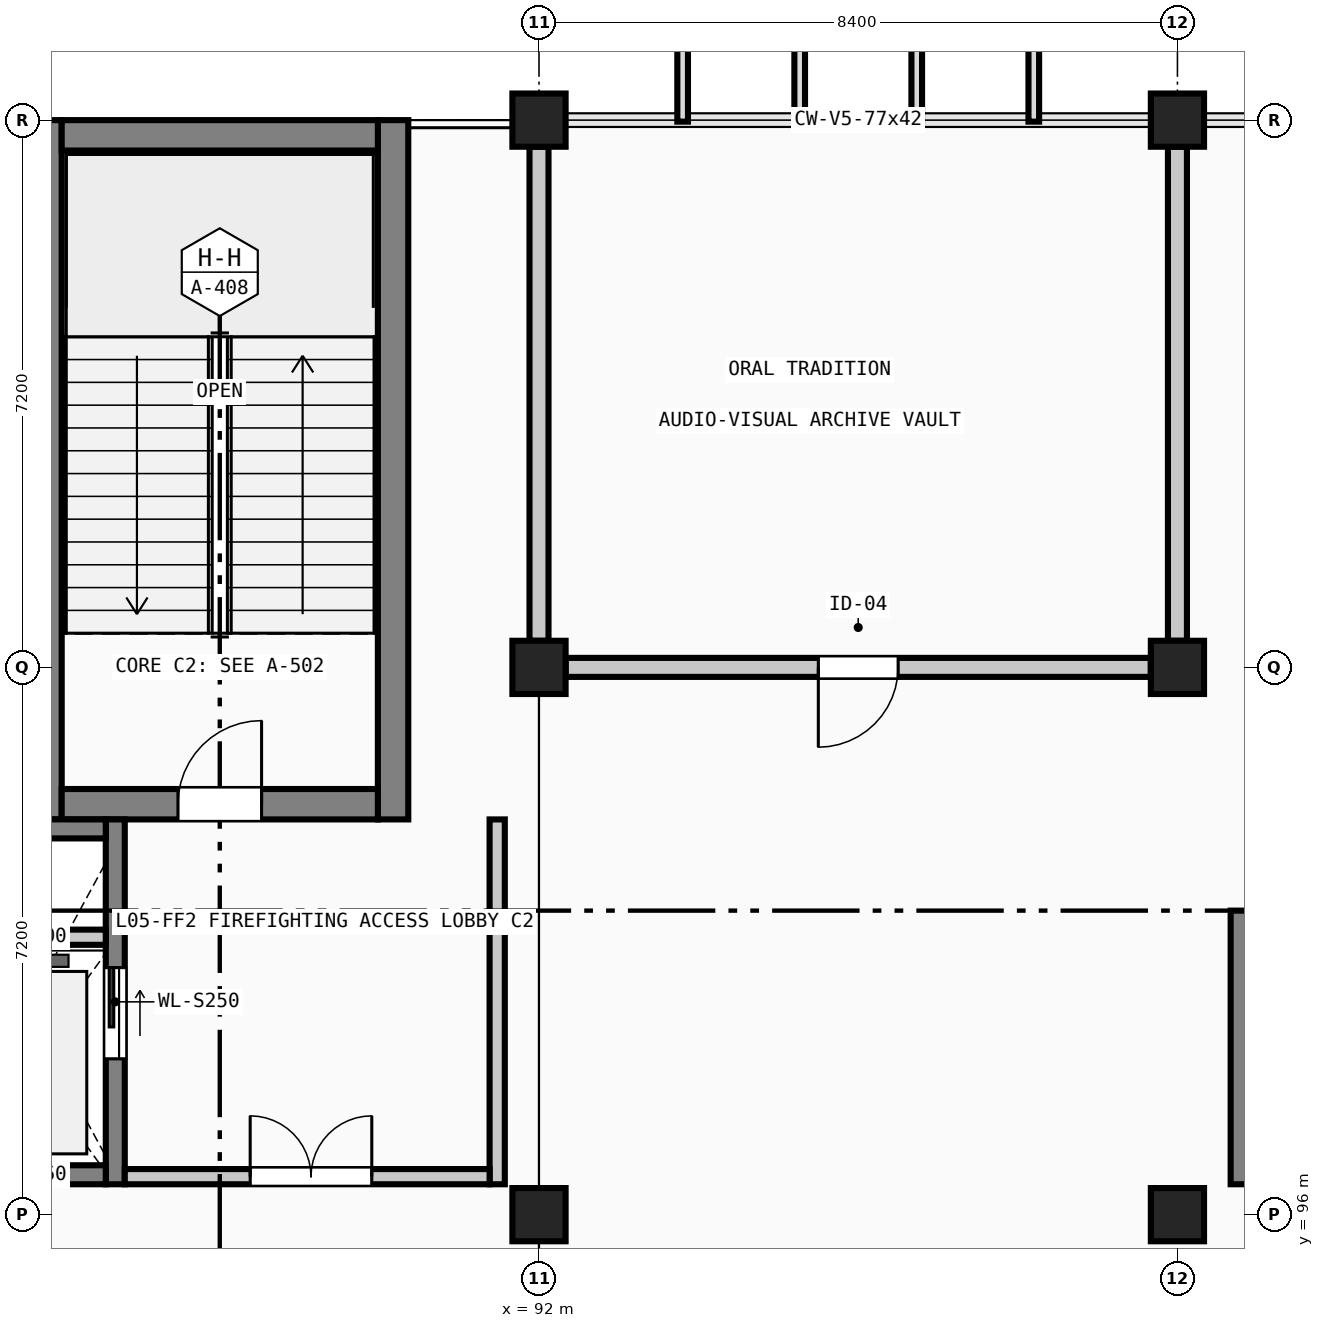
"""IFC4 building model, lengths in metres.
Left out: names, types, materials, properties, quantities, classifications, styles, units other than length and angle.
Written with IfcOpenShell. Run it as: python <this file> out.ifc"""

import sys

from ifc_helpers import new_model, si_unit, direction, frame, frame_2d, origin, origin_2d, place, context, subcontext, project, spatial, rectangle, extrude, element, fill, save


model = new_model("IFC4")
c1 = context("Model", 3, precision=1e-05, world=origin(), true_north=direction((0.0, 1.0)))
c2 = subcontext(c1, "Body", "Model", "MODEL_VIEW")
j1 = project(units=[si_unit("LENGTHUNIT", "METRE"), si_unit("PLANEANGLEUNIT", "RADIAN")], contexts=[c1])
p1 = place(None, origin())
s1 = spatial("IfcSite", under=j1, at=p1, CompositionType="ELEMENT")
p2 = place(p1, origin())
s2 = spatial("IfcBuilding", under=s1, at=p2, CompositionType="ELEMENT")
p3 = place(p2, frame((0.0, 0.0, 23.36)))
s3 = spatial("IfcBuildingStorey", under=s2, at=p3, CompositionType="ELEMENT", Elevation=23.36)
for number, where, z_axis, x_axis in (
    (1, (92.0, 96.0, 0.0), (0.0, 0.0, 1.0), (1.0, 0.0, 0.0)),
    (2, (92.0, 103.2, 0.0), (0.0, 0.0, 1.0), (1.0, 0.0, 0.0)),
    (3, (92.0, 110.4, 0.0), (0.0, 0.0, 1.0), (1.0, 0.0, 0.0)),
    (4, (100.4, 96.0, 0.0), (0.0, 0.0, 1.0), (1.0, 0.0, 0.0)),
    (5, (100.4, 103.2, 0.0), (0.0, 0.0, 1.0), (1.0, 0.0, 0.0)),
    (6, (100.4, 110.4, 0.0), (0.0, 0.0, 1.0), (1.0, 0.0, 0.0)),
):
    element("IfcColumn", number, at=place(p3, frame(where, z_axis=z_axis, x_axis=x_axis)), inside=s3, PredefinedType="COLUMN", context=c2, shape_type="SweptSolid", body=[
        extrude(rectangle(XDim=0.7, YDim=0.7, at=origin_2d()), origin(), (0.0, 0.0, 1.0), 4.48),
    ])
for number, where, z_axis, x_axis in (
    (7, (85.52, 101.2, 0.0), (0.0, 0.0, 1.0), (0.0, 1.0, 0.0)),
    (8, (90.08, 110.4, 0.0), (0.0, 0.0, 1.0), (0.0, -1.0, 0.0)),
):
    element("IfcWall", number, at=place(p3, frame(where, z_axis=z_axis, x_axis=x_axis)), inside=s3, PredefinedType="SHEAR", context=c2, shape_type="SweptSolid", body=[
        extrude(rectangle(XDim=9.2, YDim=0.4, at=frame_2d((4.6, 0.0))), origin(), (0.0, 0.0, 1.0), 4.205),
    ])
p4 = place(p3, frame((89.88, 101.4, 0.0), z_axis=(0.0, 0.0, 1.0), x_axis=(-1.0, 0.0, 0.0)))
e9 = element("IfcWall", 9, at=p4, inside=s3, PredefinedType="SHEAR", context=c2, shape_type="SweptSolid", body=[
    extrude(rectangle(XDim=4.16, YDim=0.4, at=frame_2d((2.08, 0.0))), origin(), (0.0, 0.0, 1.0), 4.205),
])
p5 = place(p4, frame((1.53, 0.0, 0.0)))
e10 = element("IfcOpeningElement", 10, at=p5, cuts=e9, PredefinedType="OPENING", context=c2, shape_type="SweptSolid", body=[
    extrude(rectangle(XDim=1.1, YDim=2.2, at=frame_2d((0.55, 1.1))), frame((0.0, 0.21, 0.0), z_axis=(0.0, -1.0, 0.0), x_axis=(1.0, 0.0, 0.0)), (0.0, 0.0, 1.0), 0.42),
])
p6 = place(p3, frame((85.72, 110.2, 0.0), z_axis=(0.0, 0.0, 1.0), x_axis=(1.0, 0.0, 0.0)))
e11 = element("IfcWall", 11, at=p6, inside=s3, PredefinedType="SHEAR", context=c2, shape_type="SweptSolid", body=[
    extrude(rectangle(XDim=4.16, YDim=0.4, at=frame_2d((2.08, 0.0))), origin(), (0.0, 0.0, 1.0), 4.205),
])
p7 = place(p3, frame((86.425, 101.2, 0.0), z_axis=(0.0, 0.0, 1.0), x_axis=(0.0, -1.0, 0.0)))
e12 = element("IfcWall", 12, at=p7, inside=s3, PredefinedType="SOLIDWALL", context=c2, shape_type="SweptSolid", body=[
    extrude(rectangle(XDim=4.8, YDim=0.25, at=frame_2d((2.4, 0.0))), origin(), (0.0, 0.0, 1.0), 4.205),
])
p8 = place(p7, frame((1.95, 0.0, 0.0)))
e13 = element("IfcOpeningElement", 13, at=p8, cuts=e12, PredefinedType="OPENING", context=c2, shape_type="SweptSolid", body=[
    extrude(rectangle(XDim=1.2, YDim=2.2, at=frame_2d((0.6, 1.1))), frame((0.0, 0.135, 0.0), z_axis=(0.0, -1.0, 0.0), x_axis=(1.0, 0.0, 0.0)), (0.0, 0.0, 1.0), 0.27),
])
for number, where, z_axis, x_axis in (
    (14, (86.3, 96.525, 0.0), (0.0, 0.0, 1.0), (-1.0, 0.0, 0.0)),
    (15, (84.2, 101.075, 0.0), (0.0, 0.0, 1.0), (1.0, 0.0, 0.0)),
):
    element("IfcWall", number, at=place(p3, frame(where, z_axis=z_axis, x_axis=x_axis)), inside=s3, PredefinedType="SOLIDWALL", context=c2, shape_type="SweptSolid", body=[
        extrude(rectangle(XDim=2.1, YDim=0.25, at=frame_2d((1.05, 0.0))), origin(), (0.0, 0.0, 1.0), 4.205),
    ])
p9 = place(p3, frame((84.2, 99.65, 0.0), z_axis=(0.0, 0.0, 1.0), x_axis=(1.0, 0.0, 0.0)))
e16 = element("IfcWall", 16, at=p9, inside=s3, PredefinedType="SOLIDWALL", context=c2, shape_type="SweptSolid", body=[
    extrude(rectangle(XDim=2.1, YDim=0.2, at=frame_2d((1.05, 0.0))), origin(), (0.0, 0.0, 1.0), 4.205),
])
p10 = place(p3, frame((91.45, 101.2, 0.0), z_axis=(0.0, 0.0, 1.0), x_axis=(0.0, -1.0, 0.0)))
e17 = element("IfcWall", 17, at=p10, inside=s3, PredefinedType="SOLIDWALL", context=c2, shape_type="SweptSolid", body=[
    extrude(rectangle(XDim=4.8, YDim=0.2, at=frame_2d((2.4, 0.0))), origin(), (0.0, 0.0, 1.0), 4.205),
])
p11 = place(p3, frame((91.35, 96.5, 0.0), z_axis=(0.0, 0.0, 1.0), x_axis=(-1.0, 0.0, 0.0)))
e18 = element("IfcWall", 18, at=p11, inside=s3, PredefinedType="SOLIDWALL", context=c2, shape_type="SweptSolid", body=[
    extrude(rectangle(XDim=4.8, YDim=0.2, at=frame_2d((2.4, 0.0))), origin(), (0.0, 0.0, 1.0), 4.205),
])
p12 = place(p11, frame((1.55, 0.0, 0.0)))
e19 = element("IfcOpeningElement", 19, at=p12, cuts=e18, PredefinedType="OPENING", context=c2, shape_type="SweptSolid", body=[
    extrude(rectangle(XDim=1.6, YDim=2.2, at=frame_2d((0.8, 1.1))), frame((0.0, 0.11, 0.0), z_axis=(0.0, -1.0, 0.0), x_axis=(1.0, 0.0, 0.0)), (0.0, 0.0, 1.0), 0.22),
])
p13 = place(p3, frame((101.225, 96.4, 0.0), z_axis=(0.0, 0.0, 1.0), x_axis=(0.0, 1.0, 0.0)))
e20 = element("IfcWall", 20, at=p13, inside=s3, PredefinedType="SOLIDWALL", context=c2, shape_type="SweptSolid", body=[
    extrude(rectangle(XDim=3.6, YDim=0.25, at=frame_2d((1.8, 0.0))), origin(), (0.0, 0.0, 1.0), 4.255),
])
p14 = place(p3, frame((100.05, 103.2, 0.0), z_axis=(0.0, 0.0, 1.0), x_axis=(-1.0, 0.0, 0.0)))
e21 = element("IfcWall", 21, at=p14, inside=s3, PredefinedType="SOLIDWALL", context=c2, shape_type="SweptSolid", body=[
    extrude(rectangle(XDim=7.7, YDim=0.25, at=frame_2d((3.85, 0.0))), origin(), (0.0, 0.0, 1.0), 3.53),
])
p15 = place(p14, frame((3.325, 0.0, 0.0)))
e22 = element("IfcOpeningElement", 22, at=p15, cuts=e21, PredefinedType="OPENING", context=c2, shape_type="SweptSolid", body=[
    extrude(rectangle(XDim=1.05, YDim=2.2, at=frame_2d((0.525, 1.1))), frame((0.0, 0.135, 0.0), z_axis=(0.0, -1.0, 0.0), x_axis=(1.0, 0.0, 0.0)), (0.0, 0.0, 1.0), 0.27),
])
for number, where, z_axis, x_axis in (
    (23, (92.0, 103.55, 0.0), (0.0, 0.0, 1.0), (0.0, 1.0, 0.0)),
    (24, (100.4, 110.05, 0.0), (0.0, 0.0, 1.0), (0.0, -1.0, 0.0)),
):
    element("IfcWall", number, at=place(p3, frame(where, z_axis=z_axis, x_axis=x_axis)), inside=s3, PredefinedType="SOLIDWALL", context=c2, shape_type="SweptSolid", body=[
        extrude(rectangle(XDim=6.5, YDim=0.25, at=frame_2d((3.25, 0.0))), origin(), (0.0, 0.0, 1.0), 3.53),
    ])
p16 = place(p5, frame((1.1, 0.0, 0.0), z_axis=(0.0, 0.0, 1.0), x_axis=(-1.0, 0.0, 0.0)))
e25 = element("IfcDoor", 25, at=p16, inside=s3, OperationType="SINGLE_SWING_RIGHT", PredefinedType="DOOR", context=c2, shape_type="SweptSolid", body=[
    extrude(rectangle(XDim=1.1, YDim=2.2, at=frame_2d((0.55, 1.1))), frame((0.0, 0.025, 0.0), z_axis=(0.0, -1.0, 0.0), x_axis=(1.0, 0.0, 0.0)), (0.0, 0.0, 1.0), 0.05),
])
fill(e10, e25)
p17 = place(p8, origin())
e26 = element("IfcDoor", 26, at=p17, inside=s3, OperationType="SLIDING_TO_LEFT", PredefinedType="DOOR", context=c2, shape_type="SweptSolid", body=[
    extrude(rectangle(XDim=1.2, YDim=2.2, at=frame_2d((0.6, 1.1))), frame((0.0, 0.025, 0.0), z_axis=(0.0, -1.0, 0.0), x_axis=(1.0, 0.0, 0.0)), (0.0, 0.0, 1.0), 0.05),
])
fill(e13, e26)
p18 = place(p12, frame((1.6, 0.0, 0.0), z_axis=(0.0, 0.0, 1.0), x_axis=(-1.0, 0.0, 0.0)))
e27 = element("IfcDoor", 27, at=p18, inside=s3, OperationType="DOUBLE_DOOR_SINGLE_SWING", PredefinedType="DOOR", context=c2, shape_type="SweptSolid", body=[
    extrude(rectangle(XDim=1.6, YDim=2.2, at=frame_2d((0.8, 1.1))), frame((0.0, 0.025, 0.0), z_axis=(0.0, -1.0, 0.0), x_axis=(1.0, 0.0, 0.0)), (0.0, 0.0, 1.0), 0.05),
])
fill(e19, e27)
p19 = place(p15, origin())
e28 = element("IfcDoor", 28, at=p19, inside=s3, OperationType="SINGLE_SWING_RIGHT", PredefinedType="DOOR", context=c2, shape_type="SweptSolid", body=[
    extrude(rectangle(XDim=1.05, YDim=2.2, at=frame_2d((0.525, 1.1))), frame((0.0, 0.025, 0.0), z_axis=(0.0, -1.0, 0.0), x_axis=(1.0, 0.0, 0.0)), (0.0, 0.0, 1.0), 0.05),
])
fill(e22, e28)
save(model, sys.argv[1])
